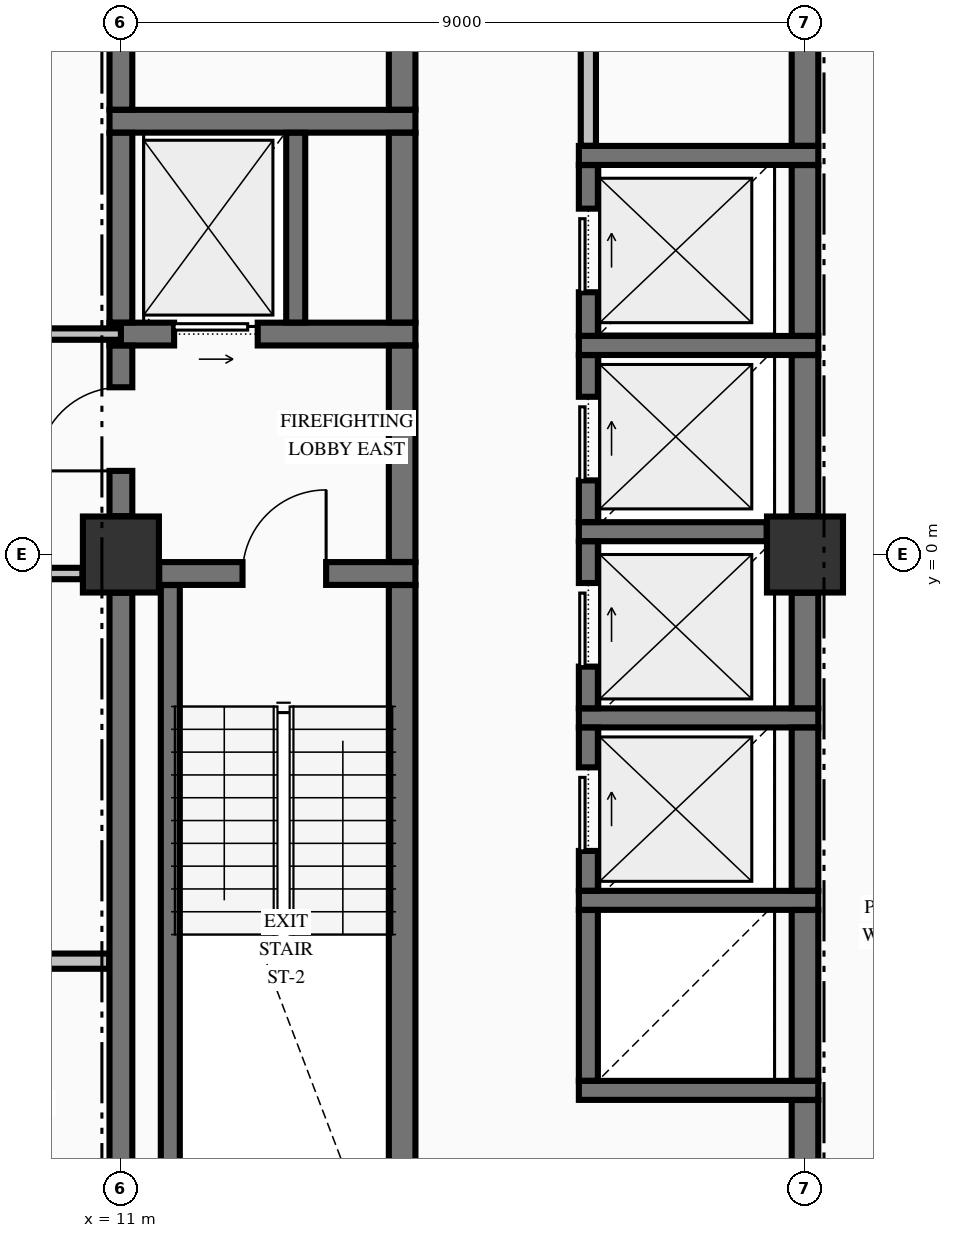
"""IFC4 building model, lengths in metres.
Left out: names, types, materials, properties, quantities, classifications, styles, units other than length and angle.
Written with IfcOpenShell. Run it as: python <this file> out.ifc"""

import sys

from ifc_helpers import new_model, si_unit, direction, frame, frame_2d, origin, origin_2d, place, context, subcontext, project, spatial, rectangle, extrude, element, fill, save


model = new_model("IFC4")
c1 = context("Model", 3, precision=1e-05, world=origin(), true_north=direction((0.0, 1.0)))
c2 = subcontext(c1, "Body", "Model", "MODEL_VIEW")
j1 = project(units=[si_unit("LENGTHUNIT", "METRE"), si_unit("PLANEANGLEUNIT", "RADIAN")], contexts=[c1])
p1 = place(None, origin())
s1 = spatial("IfcSite", under=j1, at=p1, CompositionType="ELEMENT")
p2 = place(p1, origin())
s2 = spatial("IfcBuilding", under=s1, at=p2, CompositionType="ELEMENT")
p3 = place(p2, frame((0.0, 0.0, 135.63)))
s3 = spatial("IfcBuildingStorey", under=s2, at=p3, CompositionType="ELEMENT", Elevation=135.63)
for number, where, z_axis, x_axis in (
    (1, (11.0, 0.0, -0.25), (0.0, 0.0, 1.0), (1.0, 0.0, 0.0)),
    (2, (20.0, 0.0, -0.25), (0.0, 0.0, 1.0), (1.0, 0.0, 0.0)),
):
    element("IfcColumn", number, at=place(p3, frame(where, z_axis=z_axis, x_axis=x_axis)), inside=s3, PredefinedType="COLUMN", context=c2, shape_type="SweptSolid", body=[
        extrude(rectangle(XDim=1.0, YDim=1.0, at=origin_2d()), origin(), (0.0, 0.0, 1.0), 3.57),
    ])
for number, where, z_axis, x_axis in (
    (3, (17.025, -7.05, 0.0), (0.0, 0.0, 1.0), (1.0, 0.0, 0.0)),
    (4, (17.025, -4.55, 0.0), (0.0, 0.0, 1.0), (1.0, 0.0, 0.0)),
    (5, (17.025, -2.15, 0.0), (0.0, 0.0, 1.0), (1.0, 0.0, 0.0)),
):
    element("IfcWall", number, at=place(p3, frame(where, z_axis=z_axis, x_axis=x_axis)), inside=s3, PredefinedType="SOLIDWALL", context=c2, shape_type="SweptSolid", body=[
        extrude(rectangle(XDim=3.15, YDim=0.25, at=frame_2d((1.575, 0.0))), origin(), (0.0, 0.0, 1.0), 3.32),
    ])
p4 = place(p3, frame((11.504, -0.25, 0.0), z_axis=(0.0, 0.0, 1.0), x_axis=(1.0, 0.0, 0.0)))
e6 = element("IfcWall", 6, at=p4, inside=s3, PredefinedType="SHEAR", context=c2, shape_type="SweptSolid", body=[
    extrude(rectangle(XDim=3.371, YDim=0.3, at=frame_2d((1.686, 0.0))), origin(), (0.0, 0.0, 1.0), 3.32),
])
p5 = place(p4, frame((1.096, 0.0, 0.0)))
e7 = element("IfcOpeningElement", 7, at=p5, cuts=e6, PredefinedType="OPENING", context=c2, shape_type="SweptSolid", body=[
    extrude(rectangle(XDim=1.1, YDim=2.15, at=frame_2d((0.55, 1.075))), frame((0.0, 0.16, 0.0), z_axis=(0.0, -1.0, 0.0), x_axis=(1.0, 0.0, 0.0)), (0.0, 0.0, 1.0), 0.32),
])
p6 = place(p3, frame((17.025, 0.3, 0.0), z_axis=(0.0, 0.0, 1.0), x_axis=(1.0, 0.0, 0.0)))
e8 = element("IfcWall", 8, at=p6, inside=s3, PredefinedType="SOLIDWALL", context=c2, shape_type="SweptSolid", body=[
    extrude(rectangle(XDim=2.471, YDim=0.25, at=frame_2d((1.236, 0.0))), origin(), (0.0, 0.0, 1.0), 3.32),
])
p7 = place(p3, frame((17.025, 2.75, 0.0), z_axis=(0.0, 0.0, 1.0), x_axis=(1.0, 0.0, 0.0)))
e9 = element("IfcWall", 9, at=p7, inside=s3, PredefinedType="SOLIDWALL", context=c2, shape_type="SweptSolid", body=[
    extrude(rectangle(XDim=3.15, YDim=0.25, at=frame_2d((1.575, 0.0))), origin(), (0.0, 0.0, 1.0), 3.32),
])
p8 = place(p3, frame((10.85, 2.9, 0.0), z_axis=(0.0, 0.0, 1.0), x_axis=(1.0, 0.0, 0.0)))
e10 = element("IfcWall", 10, at=p8, inside=s3, PredefinedType="SHEAR", context=c2, shape_type="SweptSolid", body=[
    extrude(rectangle(XDim=4.025, YDim=0.3, at=frame_2d((2.012, 0.0))), origin(), (0.0, 0.0, 1.0), 3.32),
])
p9 = place(p8, frame((0.85, 0.0, 0.0)))
e11 = element("IfcOpeningElement", 11, at=p9, cuts=e10, PredefinedType="OPENING", context=c2, shape_type="SweptSolid", body=[
    extrude(rectangle(XDim=1.1, YDim=2.2, at=frame_2d((0.55, 1.1))), frame((0.0, 0.16, 0.0), z_axis=(0.0, -1.0, 0.0), x_axis=(1.0, 0.0, 0.0)), (0.0, 0.0, 1.0), 0.32),
])
p10 = place(p3, frame((17.025, 5.25, 0.0), z_axis=(0.0, 0.0, 1.0), x_axis=(1.0, 0.0, 0.0)))
e12 = element("IfcWall", 12, at=p10, inside=s3, PredefinedType="SOLIDWALL", context=c2, shape_type="SweptSolid", body=[
    extrude(rectangle(XDim=3.15, YDim=0.25, at=frame_2d((1.575, 0.0))), origin(), (0.0, 0.0, 1.0), 3.32),
])
p11 = place(p3, frame((10.85, 5.7, 0.0), z_axis=(0.0, 0.0, 1.0), x_axis=(1.0, 0.0, 0.0)))
e13 = element("IfcWall", 13, at=p11, inside=s3, PredefinedType="SHEAR", context=c2, shape_type="SweptSolid", body=[
    extrude(rectangle(XDim=4.025, YDim=0.3, at=frame_2d((2.012, 0.0))), origin(), (0.0, 0.0, 1.0), 3.32),
])
p12 = place(p3, frame((-0.725, -5.35, 0.0), z_axis=(0.0, 0.0, 1.0), x_axis=(1.0, 0.0, 0.0)))
e14 = element("IfcWall", 14, at=p12, inside=s3, PredefinedType="PARTITIONING", context=c2, shape_type="SweptSolid", body=[
    extrude(rectangle(XDim=11.572, YDim=0.2, at=frame_2d((5.786, 0.0))), origin(), (0.0, 0.0, 1.0), 3.32),
])
p13 = place(p3, frame((-10.494, -0.25, 0.0), z_axis=(0.0, 0.0, 1.0), x_axis=(1.0, 0.0, 0.0)))
e15 = element("IfcWall", 15, at=p13, inside=s3, PredefinedType="PARTITIONING", context=c2, shape_type="SweptSolid", body=[
    extrude(rectangle(XDim=20.988, YDim=0.15, at=frame_2d((10.494, 0.0))), origin(), (0.0, 0.0, 1.0), 3.32),
])
p14 = place(p13, frame((8.194, 0.0, 0.0)))
e16 = element("IfcOpeningElement", 16, at=p14, cuts=e15, PredefinedType="OPENING", context=c2, shape_type="SweptSolid", body=[
    extrude(rectangle(XDim=1.1, YDim=2.15, at=frame_2d((0.55, 1.075))), frame((0.0, 0.085, 0.0), z_axis=(0.0, -1.0, 0.0), x_axis=(1.0, 0.0, 0.0)), (0.0, 0.0, 1.0), 0.17),
])
p15 = place(p13, frame((3.049, 0.0, 0.0)))
e17 = element("IfcOpeningElement", 17, at=p15, cuts=e15, PredefinedType="OPENING", context=c2, shape_type="SweptSolid", body=[
    extrude(rectangle(XDim=1.05, YDim=2.15, at=frame_2d((0.525, 1.075))), frame((0.0, 0.085, 0.0), z_axis=(0.0, -1.0, 0.0), x_axis=(1.0, 0.0, 0.0)), (0.0, 0.0, 1.0), 0.17),
])
p16 = place(p13, frame((15.189, 0.0, 0.0)))
e18 = element("IfcOpeningElement", 18, at=p16, cuts=e15, PredefinedType="OPENING", context=c2, shape_type="SweptSolid", body=[
    extrude(rectangle(XDim=0.95, YDim=2.15, at=frame_2d((0.475, 1.075))), frame((0.0, 0.085, 0.0), z_axis=(0.0, -1.0, 0.0), x_axis=(1.0, 0.0, 0.0)), (0.0, 0.0, 1.0), 0.17),
])
p17 = place(p3, frame((-11.0, 2.9, 0.0), z_axis=(0.0, 0.0, 1.0), x_axis=(1.0, 0.0, 0.0)))
e19 = element("IfcWall", 19, at=p17, inside=s3, PredefinedType="PARTITIONING", context=c2, shape_type="SweptSolid", body=[
    extrude(rectangle(XDim=22.0, YDim=0.15, at=frame_2d((11.0, 0.0))), origin(), (0.0, 0.0, 1.0), 3.32),
])
p18 = place(p17, frame((8.7, 0.0, 0.0)))
e20 = element("IfcOpeningElement", 20, at=p18, cuts=e19, PredefinedType="OPENING", context=c2, shape_type="SweptSolid", body=[
    extrude(rectangle(XDim=1.1, YDim=2.15, at=frame_2d((0.55, 1.075))), frame((0.0, 0.085, 0.0), z_axis=(0.0, -1.0, 0.0), x_axis=(1.0, 0.0, 0.0)), (0.0, 0.0, 1.0), 0.17),
])
p19 = place(p17, frame((3.555, 0.0, 0.0)))
e21 = element("IfcOpeningElement", 21, at=p19, cuts=e19, PredefinedType="OPENING", context=c2, shape_type="SweptSolid", body=[
    extrude(rectangle(XDim=1.05, YDim=2.15, at=frame_2d((0.525, 1.075))), frame((0.0, 0.085, 0.0), z_axis=(0.0, -1.0, 0.0), x_axis=(1.0, 0.0, 0.0)), (0.0, 0.0, 1.0), 0.17),
])
p20 = place(p17, frame((15.62, 0.0, 0.0)))
e22 = element("IfcOpeningElement", 22, at=p20, cuts=e19, PredefinedType="OPENING", context=c2, shape_type="SweptSolid", body=[
    extrude(rectangle(XDim=1.1, YDim=2.15, at=frame_2d((0.55, 1.075))), frame((0.0, 0.085, 0.0), z_axis=(0.0, -1.0, 0.0), x_axis=(1.0, 0.0, 0.0)), (0.0, 0.0, 1.0), 0.17),
])
p21 = place(p3, frame((11.0, -9.446, 0.0), z_axis=(0.0, 0.0, 1.0), x_axis=(0.0, 1.0, 0.0)))
e23 = element("IfcWall", 23, at=p21, inside=s3, PredefinedType="SHEAR", context=c2, shape_type="SweptSolid", body=[
    extrude(rectangle(XDim=8.942, YDim=0.3, at=frame_2d((4.471, 0.0))), origin(), (0.0, 0.0, 1.0), 3.32),
])
p22 = place(p3, frame((11.0, 0.504, 0.0), z_axis=(0.0, 0.0, 1.0), x_axis=(0.0, 1.0, 0.0)))
e24 = element("IfcWall", 24, at=p22, inside=s3, PredefinedType="SHEAR", context=c2, shape_type="SweptSolid", body=[
    extrude(rectangle(XDim=2.244, YDim=0.3, at=frame_2d((1.122, 0.0))), origin(), (0.0, 0.0, 1.0), 3.32),
])
p23 = place(p22, frame((0.596, 0.0, 0.0)))
e25 = element("IfcOpeningElement", 25, at=p23, cuts=e24, PredefinedType="OPENING", context=c2, shape_type="SweptSolid", body=[
    extrude(rectangle(XDim=1.1, YDim=2.15, at=frame_2d((0.55, 1.075))), frame((0.0, 0.16, 0.0), z_axis=(0.0, -1.0, 0.0), x_axis=(1.0, 0.0, 0.0)), (0.0, 0.0, 1.0), 0.32),
])
p24 = place(p3, frame((11.0, 3.052, 0.0), z_axis=(0.0, 0.0, 1.0), x_axis=(0.0, 1.0, 0.0)))
e26 = element("IfcWall", 26, at=p24, inside=s3, PredefinedType="SHEAR", context=c2, shape_type="SweptSolid", body=[
    extrude(rectangle(XDim=2.496, YDim=0.3, at=frame_2d((1.248, 0.0))), origin(), (0.0, 0.0, 1.0), 3.32),
])
p25 = place(p3, frame((11.0, 5.852, 0.0), z_axis=(0.0, 0.0, 1.0), x_axis=(0.0, 1.0, 0.0)))
e27 = element("IfcWall", 27, at=p25, inside=s3, PredefinedType="SHEAR", context=c2, shape_type="SweptSolid", body=[
    extrude(rectangle(XDim=4.144, YDim=0.3, at=frame_2d((2.072, 0.0))), origin(), (0.0, 0.0, 1.0), 3.32),
])
p26 = place(p3, frame((11.65, -9.798, 0.0), z_axis=(0.0, 0.0, 1.0), x_axis=(0.0, 1.0, 0.0)))
e28 = element("IfcWall", 28, at=p26, inside=s3, PredefinedType="SOLIDWALL", context=c2, shape_type="SweptSolid", body=[
    extrude(rectangle(XDim=9.396, YDim=0.25, at=frame_2d((4.698, 0.0))), origin(), (0.0, 0.0, 1.0), 3.32),
])
p27 = place(p3, frame((13.3, 3.052, 0.0), z_axis=(0.0, 0.0, 1.0), x_axis=(0.0, 1.0, 0.0)))
e29 = element("IfcWall", 29, at=p27, inside=s3, PredefinedType="SOLIDWALL", context=c2, shape_type="SweptSolid", body=[
    extrude(rectangle(XDim=2.496, YDim=0.25, at=frame_2d((1.248, 0.0))), origin(), (0.0, 0.0, 1.0), 3.32),
])
p28 = place(p3, frame((14.7, -9.773, 0.0), z_axis=(0.0, 0.0, 1.0), x_axis=(0.0, 1.0, 0.0)))
e30 = element("IfcWall", 30, at=p28, inside=s3, PredefinedType="SHEAR", context=c2, shape_type="SweptSolid", body=[
    extrude(rectangle(XDim=9.371, YDim=0.35, at=frame_2d((4.686, 0.0))), origin(), (0.0, 0.0, 1.0), 3.32),
])
p29 = place(p3, frame((14.7, -0.098, 0.0), z_axis=(0.0, 0.0, 1.0), x_axis=(0.0, 1.0, 0.0)))
e31 = element("IfcWall", 31, at=p29, inside=s3, PredefinedType="SHEAR", context=c2, shape_type="SweptSolid", body=[
    extrude(rectangle(XDim=2.846, YDim=0.35, at=frame_2d((1.423, 0.0))), origin(), (0.0, 0.0, 1.0), 3.32),
])
p30 = place(p3, frame((14.7, 3.052, 0.0), z_axis=(0.0, 0.0, 1.0), x_axis=(0.0, 1.0, 0.0)))
e32 = element("IfcWall", 32, at=p30, inside=s3, PredefinedType="SHEAR", context=c2, shape_type="SweptSolid", body=[
    extrude(rectangle(XDim=2.496, YDim=0.35, at=frame_2d((1.248, 0.0))), origin(), (0.0, 0.0, 1.0), 3.32),
])
p31 = place(p3, frame((14.7, 5.852, 0.0), z_axis=(0.0, 0.0, 1.0), x_axis=(0.0, 1.0, 0.0)))
e33 = element("IfcWall", 33, at=p31, inside=s3, PredefinedType="SHEAR", context=c2, shape_type="SweptSolid", body=[
    extrude(rectangle(XDim=4.471, YDim=0.35, at=frame_2d((2.235, 0.0))), origin(), (0.0, 0.0, 1.0), 3.32),
])
p32 = place(p3, frame((17.15, -6.923, 0.0), z_axis=(0.0, 0.0, 1.0), x_axis=(0.0, 1.0, 0.0)))
e34 = element("IfcWall", 34, at=p32, inside=s3, PredefinedType="SOLIDWALL", context=c2, shape_type="SweptSolid", body=[
    extrude(rectangle(XDim=2.246, YDim=0.25, at=frame_2d((1.123, 0.0))), origin(), (0.0, 0.0, 1.0), 3.32),
])
p33 = place(p3, frame((17.15, -4.423, 0.0), z_axis=(0.0, 0.0, 1.0), x_axis=(0.0, 1.0, 0.0)))
e35 = element("IfcWall", 35, at=p33, inside=s3, PredefinedType="SOLIDWALL", context=c2, shape_type="SweptSolid", body=[
    extrude(rectangle(XDim=2.146, YDim=0.25, at=frame_2d((1.073, 0.0))), origin(), (0.0, 0.0, 1.0), 3.32),
])
p34 = place(p33, frame((0.523, 0.0, 0.0)))
e36 = element("IfcOpeningElement", 36, at=p34, cuts=e35, PredefinedType="OPENING", context=c2, shape_type="SweptSolid", body=[
    extrude(rectangle(XDim=1.1, YDim=2.2, at=frame_2d((0.55, 1.1))), frame((0.0, 0.135, 0.0), z_axis=(0.0, -1.0, 0.0), x_axis=(1.0, 0.0, 0.0)), (0.0, 0.0, 1.0), 0.27),
])
p35 = place(p3, frame((17.15, -2.023, 0.0), z_axis=(0.0, 0.0, 1.0), x_axis=(0.0, 1.0, 0.0)))
e37 = element("IfcWall", 37, at=p35, inside=s3, PredefinedType="SOLIDWALL", context=c2, shape_type="SweptSolid", body=[
    extrude(rectangle(XDim=2.196, YDim=0.25, at=frame_2d((1.098, 0.0))), origin(), (0.0, 0.0, 1.0), 3.32),
])
p36 = place(p35, frame((0.548, 0.0, 0.0)))
e38 = element("IfcOpeningElement", 38, at=p36, cuts=e37, PredefinedType="OPENING", context=c2, shape_type="SweptSolid", body=[
    extrude(rectangle(XDim=1.1, YDim=2.2, at=frame_2d((0.55, 1.1))), frame((0.0, 0.135, 0.0), z_axis=(0.0, -1.0, 0.0), x_axis=(1.0, 0.0, 0.0)), (0.0, 0.0, 1.0), 0.27),
])
p37 = place(p3, frame((17.15, 0.427, 0.0), z_axis=(0.0, 0.0, 1.0), x_axis=(0.0, 1.0, 0.0)))
e39 = element("IfcWall", 39, at=p37, inside=s3, PredefinedType="SOLIDWALL", context=c2, shape_type="SweptSolid", body=[
    extrude(rectangle(XDim=2.196, YDim=0.25, at=frame_2d((1.098, 0.0))), origin(), (0.0, 0.0, 1.0), 3.32),
])
p38 = place(p37, frame((0.548, 0.0, 0.0)))
e40 = element("IfcOpeningElement", 40, at=p38, cuts=e39, PredefinedType="OPENING", context=c2, shape_type="SweptSolid", body=[
    extrude(rectangle(XDim=1.1, YDim=2.2, at=frame_2d((0.55, 1.1))), frame((0.0, 0.135, 0.0), z_axis=(0.0, -1.0, 0.0), x_axis=(1.0, 0.0, 0.0)), (0.0, 0.0, 1.0), 0.27),
])
p39 = place(p3, frame((17.15, 2.877, 0.0), z_axis=(0.0, 0.0, 1.0), x_axis=(0.0, 1.0, 0.0)))
e41 = element("IfcWall", 41, at=p39, inside=s3, PredefinedType="SOLIDWALL", context=c2, shape_type="SweptSolid", body=[
    extrude(rectangle(XDim=2.246, YDim=0.25, at=frame_2d((1.123, 0.0))), origin(), (0.0, 0.0, 1.0), 3.32),
])
p40 = place(p39, frame((0.573, 0.0, 0.0)))
e42 = element("IfcOpeningElement", 42, at=p40, cuts=e41, PredefinedType="OPENING", context=c2, shape_type="SweptSolid", body=[
    extrude(rectangle(XDim=1.1, YDim=2.2, at=frame_2d((0.55, 1.1))), frame((0.0, 0.135, 0.0), z_axis=(0.0, -1.0, 0.0), x_axis=(1.0, 0.0, 0.0)), (0.0, 0.0, 1.0), 0.27),
])
p41 = place(p3, frame((20.0, -9.446, 0.0), z_axis=(0.0, 0.0, 1.0), x_axis=(0.0, 1.0, 0.0)))
e43 = element("IfcWall", 43, at=p41, inside=s3, PredefinedType="SHEAR", context=c2, shape_type="SweptSolid", body=[
    extrude(rectangle(XDim=2.269, YDim=0.35, at=frame_2d((1.135, 0.0))), origin(), (0.0, 0.0, 1.0), 3.32),
])
p42 = place(p3, frame((20.0, -6.923, 0.0), z_axis=(0.0, 0.0, 1.0), x_axis=(0.0, 1.0, 0.0)))
e44 = element("IfcWall", 44, at=p42, inside=s3, PredefinedType="SHEAR", context=c2, shape_type="SweptSolid", body=[
    extrude(rectangle(XDim=2.246, YDim=0.35, at=frame_2d((1.123, 0.0))), origin(), (0.0, 0.0, 1.0), 3.32),
])
p43 = place(p3, frame((20.0, -4.423, 0.0), z_axis=(0.0, 0.0, 1.0), x_axis=(0.0, 1.0, 0.0)))
e45 = element("IfcWall", 45, at=p43, inside=s3, PredefinedType="SHEAR", context=c2, shape_type="SweptSolid", body=[
    extrude(rectangle(XDim=2.146, YDim=0.35, at=frame_2d((1.073, 0.0))), origin(), (0.0, 0.0, 1.0), 3.32),
])
p44 = place(p3, frame((20.0, -2.023, 0.0), z_axis=(0.0, 0.0, 1.0), x_axis=(0.0, 1.0, 0.0)))
e46 = element("IfcWall", 46, at=p44, inside=s3, PredefinedType="SHEAR", context=c2, shape_type="SweptSolid", body=[
    extrude(rectangle(XDim=1.519, YDim=0.35, at=frame_2d((0.76, 0.0))), origin(), (0.0, 0.0, 1.0), 3.32),
])
p45 = place(p3, frame((20.0, 0.504, 0.0), z_axis=(0.0, 0.0, 1.0), x_axis=(0.0, 1.0, 0.0)))
e47 = element("IfcWall", 47, at=p45, inside=s3, PredefinedType="SHEAR", context=c2, shape_type="SweptSolid", body=[
    extrude(rectangle(XDim=2.119, YDim=0.35, at=frame_2d((1.06, 0.0))), origin(), (0.0, 0.0, 1.0), 3.32),
])
p46 = place(p3, frame((20.0, 2.877, 0.0), z_axis=(0.0, 0.0, 1.0), x_axis=(0.0, 1.0, 0.0)))
e48 = element("IfcWall", 48, at=p46, inside=s3, PredefinedType="SHEAR", context=c2, shape_type="SweptSolid", body=[
    extrude(rectangle(XDim=2.246, YDim=0.35, at=frame_2d((1.123, 0.0))), origin(), (0.0, 0.0, 1.0), 3.32),
])
p47 = place(p3, frame((20.0, 5.377, 0.0), z_axis=(0.0, 0.0, 1.0), x_axis=(0.0, 1.0, 0.0)))
e49 = element("IfcWall", 49, at=p47, inside=s3, PredefinedType="SHEAR", context=c2, shape_type="SweptSolid", body=[
    extrude(rectangle(XDim=4.619, YDim=0.35, at=frame_2d((2.31, 0.0))), origin(), (0.0, 0.0, 1.0), 3.32),
])
p48 = place(p3, frame((17.15, 5.378, 0.0), z_axis=(0.0, 0.0, 1.0), x_axis=(0.0, 1.0, 0.0)))
e50 = element("IfcWall", 50, at=p48, inside=s3, PredefinedType="PARTITIONING", context=c2, shape_type="SweptSolid", body=[
    extrude(rectangle(XDim=4.944, YDim=0.2, at=frame_2d((2.472, 0.0))), origin(), (0.0, 0.0, 1.0), 3.32),
])
p49 = place(p5, origin())
e51 = element("IfcDoor", 51, at=p49, inside=s3, OperationType="SINGLE_SWING_RIGHT", PredefinedType="DOOR", context=c2, shape_type="SweptSolid", body=[
    extrude(rectangle(XDim=1.1, YDim=2.15, at=frame_2d((0.55, 1.075))), frame((0.0, 0.025, 0.0), z_axis=(0.0, -1.0, 0.0), x_axis=(1.0, 0.0, 0.0)), (0.0, 0.0, 1.0), 0.05),
])
fill(e7, e51)
p50 = place(p23, origin())
e52 = element("IfcDoor", 52, at=p50, inside=s3, OperationType="SINGLE_SWING_LEFT", PredefinedType="DOOR", context=c2, shape_type="SweptSolid", body=[
    extrude(rectangle(XDim=1.1, YDim=2.15, at=frame_2d((0.55, 1.075))), frame((0.0, 0.025, 0.0), z_axis=(0.0, -1.0, 0.0), x_axis=(1.0, 0.0, 0.0)), (0.0, 0.0, 1.0), 0.05),
])
fill(e25, e52)
p51 = place(p9, origin())
e53 = element("IfcDoor", 53, at=p51, inside=s3, OperationType="SLIDING_TO_RIGHT", PredefinedType="DOOR", context=c2, shape_type="SweptSolid", body=[
    extrude(rectangle(XDim=1.1, YDim=2.2, at=frame_2d((0.55, 1.1))), frame((0.0, 0.025, 0.0), z_axis=(0.0, -1.0, 0.0), x_axis=(1.0, 0.0, 0.0)), (0.0, 0.0, 1.0), 0.05),
])
fill(e11, e53)
p52 = place(p34, origin())
e54 = element("IfcDoor", 54, at=p52, inside=s3, OperationType="SLIDING_TO_RIGHT", PredefinedType="DOOR", context=c2, shape_type="SweptSolid", body=[
    extrude(rectangle(XDim=1.1, YDim=2.2, at=frame_2d((0.55, 1.1))), frame((0.0, 0.025, 0.0), z_axis=(0.0, -1.0, 0.0), x_axis=(1.0, 0.0, 0.0)), (0.0, 0.0, 1.0), 0.05),
])
fill(e36, e54)
p53 = place(p36, origin())
e55 = element("IfcDoor", 55, at=p53, inside=s3, OperationType="SLIDING_TO_RIGHT", PredefinedType="DOOR", context=c2, shape_type="SweptSolid", body=[
    extrude(rectangle(XDim=1.1, YDim=2.2, at=frame_2d((0.55, 1.1))), frame((0.0, 0.025, 0.0), z_axis=(0.0, -1.0, 0.0), x_axis=(1.0, 0.0, 0.0)), (0.0, 0.0, 1.0), 0.05),
])
fill(e38, e55)
p54 = place(p38, origin())
e56 = element("IfcDoor", 56, at=p54, inside=s3, OperationType="SLIDING_TO_RIGHT", PredefinedType="DOOR", context=c2, shape_type="SweptSolid", body=[
    extrude(rectangle(XDim=1.1, YDim=2.2, at=frame_2d((0.55, 1.1))), frame((0.0, 0.025, 0.0), z_axis=(0.0, -1.0, 0.0), x_axis=(1.0, 0.0, 0.0)), (0.0, 0.0, 1.0), 0.05),
])
fill(e40, e56)
p55 = place(p40, origin())
e57 = element("IfcDoor", 57, at=p55, inside=s3, OperationType="SLIDING_TO_RIGHT", PredefinedType="DOOR", context=c2, shape_type="SweptSolid", body=[
    extrude(rectangle(XDim=1.1, YDim=2.2, at=frame_2d((0.55, 1.1))), frame((0.0, 0.025, 0.0), z_axis=(0.0, -1.0, 0.0), x_axis=(1.0, 0.0, 0.0)), (0.0, 0.0, 1.0), 0.05),
])
fill(e42, e57)
save(model, sys.argv[1])
